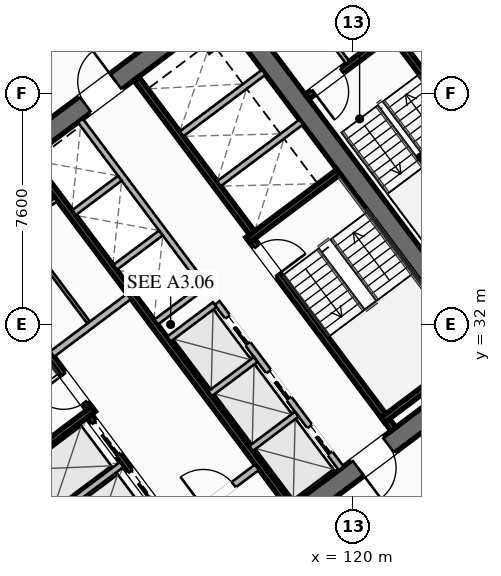
"""IFC4 building model, lengths in metres.
Left out: names, types, materials, properties, quantities, classifications, styles, units other than length and angle.
Written with IfcOpenShell. Run it as: python <this file> out.ifc"""

import sys

from ifc_helpers import new_model, si_unit, direction, frame, frame_2d, origin, place, context, subcontext, project, spatial, rectangle, extrude, element, fill, save


model = new_model("IFC4")
c1 = context("Model", 3, precision=1e-05, world=origin(), true_north=direction((0.0, 1.0)))
c2 = subcontext(c1, "Body", "Model", "MODEL_VIEW")
j1 = project(units=[si_unit("LENGTHUNIT", "METRE"), si_unit("PLANEANGLEUNIT", "RADIAN")], contexts=[c1])
p1 = place(None, origin())
s1 = spatial("IfcSite", under=j1, at=p1, CompositionType="ELEMENT")
p2 = place(p1, origin())
s2 = spatial("IfcBuilding", under=s1, at=p2, CompositionType="ELEMENT")
p3 = place(p2, frame((0.0, 0.0, 95.6)))
s3 = spatial("IfcBuildingStorey", under=s2, at=p3, CompositionType="ELEMENT", Elevation=95.6)
for number, where, z_axis, x_axis in (
    (1, (112.476, 21.107, 0.0), (0.0, 0.0, 1.0), (-0.6, 0.8, 0.0)),
    (2, (115.524, 42.893, 0.0), (0.0, 0.0, 1.0), (0.6, -0.8, 0.0)),
):
    element("IfcWall", number, at=place(p3, frame(where, z_axis=z_axis, x_axis=x_axis)), inside=s3, PredefinedType="SHEAR", context=c2, shape_type="SweptSolid", body=[
        extrude(rectangle(XDim=15.6, YDim=0.65, at=frame_2d((7.8, 0.0))), origin(), (0.0, 0.0, 1.0), 3.55),
    ])
p4 = place(p3, frame((124.429, 30.478, 0.0), z_axis=(0.0, 0.0, 1.0), x_axis=(-0.799998028465, -0.600002628705, 0.0)))
e3 = element("IfcWall", 3, at=p4, inside=s3, PredefinedType="SHEAR", context=c2, shape_type="SweptSolid", body=[
    extrude(rectangle(XDim=14.86, YDim=0.65, at=frame_2d((7.43, 0.0))), origin(), (0.0, 0.0, 1.0), 3.55),
])
p5 = place(p4, frame((9.13, 0.0, 0.0)))
e4 = element("IfcOpeningElement", 4, at=p5, cuts=e3, PredefinedType="OPENING", context=c2, shape_type="SweptSolid", body=[
    extrude(rectangle(XDim=1.25, YDim=2.25, at=frame_2d((0.625, 1.125))), frame((0.0, 0.335, 0.0), z_axis=(0.0, -1.0, 0.0), x_axis=(1.0, 0.0, 0.0)), (0.0, 0.0, 1.0), 0.67),
])
p6 = place(p4, frame((4.08, 0.0, 0.0)))
e5 = element("IfcOpeningElement", 5, at=p6, cuts=e3, PredefinedType="OPENING", context=c2, shape_type="SweptSolid", body=[
    extrude(rectangle(XDim=1.25, YDim=2.25, at=frame_2d((0.625, 1.125))), frame((0.0, 0.335, 0.0), z_axis=(0.0, -1.0, 0.0), x_axis=(1.0, 0.0, 0.0)), (0.0, 0.0, 1.0), 0.67),
])
p7 = place(p3, frame((103.571, 33.522, 0.0), z_axis=(0.0, 0.0, 1.0), x_axis=(0.799998028465, 0.600002628705, 0.0)))
e6 = element("IfcWall", 6, at=p7, inside=s3, PredefinedType="SHEAR", context=c2, shape_type="SweptSolid", body=[
    extrude(rectangle(XDim=14.86, YDim=0.65, at=frame_2d((7.43, 0.0))), origin(), (0.0, 0.0, 1.0), 3.55),
])
p8 = place(p7, frame((4.48, 0.0, 0.0)))
e7 = element("IfcOpeningElement", 7, at=p8, cuts=e6, PredefinedType="OPENING", context=c2, shape_type="SweptSolid", body=[
    extrude(rectangle(XDim=1.25, YDim=2.25, at=frame_2d((0.625, 1.125))), frame((0.0, 0.335, 0.0), z_axis=(0.0, -1.0, 0.0), x_axis=(1.0, 0.0, 0.0)), (0.0, 0.0, 1.0), 0.67),
])
p9 = place(p7, frame((9.53, 0.0, 0.0)))
e8 = element("IfcOpeningElement", 8, at=p9, cuts=e6, PredefinedType="OPENING", context=c2, shape_type="SweptSolid", body=[
    extrude(rectangle(XDim=1.25, YDim=2.25, at=frame_2d((0.625, 1.125))), frame((0.0, 0.335, 0.0), z_axis=(0.0, -1.0, 0.0), x_axis=(1.0, 0.0, 0.0)), (0.0, 0.0, 1.0), 0.67),
])
p10 = place(p3, frame((111.44, 29.08, 0.0), z_axis=(0.0, 0.0, 1.0), x_axis=(-0.600009827119, 0.799992629566, 0.0)))
e9 = element("IfcWall", 9, at=p10, inside=s3, PredefinedType="SHEAR", context=c2, shape_type="SweptSolid", body=[
    extrude(rectangle(XDim=7.95, YDim=0.2, at=frame_2d((3.975, 0.0))), origin(), (0.0, 0.0, 1.0), 3.35),
])
p11 = place(p10, frame((0.45, 0.0, 0.0)))
e10 = element("IfcOpeningElement", 10, at=p11, cuts=e9, PredefinedType="OPENING", context=c2, shape_type="SweptSolid", body=[
    extrude(rectangle(XDim=1.15, YDim=2.2, at=frame_2d((0.575, 1.1))), frame((0.0, 0.11, 0.0), z_axis=(0.0, -1.0, 0.0), x_axis=(1.0, 0.0, 0.0)), (0.0, 0.0, 1.0), 0.22),
])
p12 = place(p3, frame((108.476, 26.982, 0.0), z_axis=(0.0, 0.0, 1.0), x_axis=(0.799984290658, 0.600020945218, 0.0)))
e11 = element("IfcWall", 11, at=p12, inside=s3, PredefinedType="SHEAR", context=c2, shape_type="SweptSolid", body=[
    extrude(rectangle(XDim=3.73, YDim=0.2, at=frame_2d((1.865, 0.0))), origin(), (0.0, 0.0, 1.0), 3.35),
])
p13 = place(p3, frame((116.56, 34.92, 0.0), z_axis=(0.0, 0.0, 1.0), x_axis=(0.600009827119, -0.799992629566, 0.0)))
e12 = element("IfcWall", 12, at=p13, inside=s3, PredefinedType="SHEAR", context=c2, shape_type="SweptSolid", body=[
    extrude(rectangle(XDim=7.95, YDim=0.2, at=frame_2d((3.975, 0.0))), origin(), (0.0, 0.0, 1.0), 3.35),
])
p14 = place(p13, frame((0.45, 0.0, 0.0)))
e13 = element("IfcOpeningElement", 13, at=p14, cuts=e12, PredefinedType="OPENING", context=c2, shape_type="SweptSolid", body=[
    extrude(rectangle(XDim=1.15, YDim=2.2, at=frame_2d((0.575, 1.1))), frame((0.0, 0.11, 0.0), z_axis=(0.0, -1.0, 0.0), x_axis=(1.0, 0.0, 0.0)), (0.0, 0.0, 1.0), 0.22),
])
for number, where, z_axis, x_axis in (
    (14, (116.54, 34.78, 0.0), (0.0, 0.0, 1.0), (0.8, 0.6, 0.0)),
    (15, (120.98, 28.86, 0.0), (0.0, 0.0, 1.0), (0.8, 0.6, 0.0)),
):
    element("IfcWall", number, at=place(p3, frame(where, z_axis=z_axis, x_axis=x_axis)), inside=s3, PredefinedType="SHEAR", context=c2, shape_type="SweptSolid", body=[
        extrude(rectangle(XDim=3.73, YDim=0.2, at=frame_2d((1.865, 0.0))), origin(), (0.0, 0.0, 1.0), 3.35),
    ])
p15 = place(p3, frame((117.938, 26.016, 0.0), z_axis=(0.0, 0.0, 1.0), x_axis=(-0.600005463273, 0.799995902516, 0.0)))
e16 = element("IfcWall", 16, at=p15, inside=s3, PredefinedType="SHEAR", context=c2, shape_type="SweptSolid", body=[
    extrude(rectangle(XDim=14.3, YDim=0.2, at=frame_2d((7.15, 0.0))), origin(), (0.0, 0.0, 1.0), 3.35),
])
p16 = place(p3, frame((110.104, 31.028, 0.0), z_axis=(0.0, 0.0, 1.0), x_axis=(0.800018601094, 0.59997519774, 0.0)))
e17 = element("IfcWall", 17, at=p16, inside=s3, PredefinedType="SOLIDWALL", context=c2, shape_type="SweptSolid", body=[
    extrude(rectangle(XDim=3.15, YDim=0.22, at=frame_2d((1.575, 0.0))), origin(), (0.0, 0.0, 1.0), 2.703),
])
p17 = place(p3, frame((114.316, 25.412, 0.0), z_axis=(0.0, 0.0, 1.0), x_axis=(0.800018601094, 0.59997519774, 0.0)))
e18 = element("IfcWall", 18, at=p17, inside=s3, PredefinedType="SOLIDWALL", context=c2, shape_type="SweptSolid", body=[
    extrude(rectangle(XDim=3.15, YDim=0.22, at=frame_2d((1.575, 0.0))), origin(), (0.0, 0.0, 1.0), 2.703),
])
p18 = place(p17, frame((0.95, 0.0, 0.0)))
e19 = element("IfcOpeningElement", 19, at=p18, cuts=e18, PredefinedType="OPENING", context=c2, shape_type="SweptSolid", body=[
    extrude(rectangle(XDim=1.25, YDim=2.25, at=frame_2d((0.625, 1.125))), frame((0.0, 0.12, 0.0), z_axis=(0.0, -1.0, 0.0), x_axis=(1.0, 0.0, 0.0)), (0.0, 0.0, 1.0), 0.24),
])
p19 = place(p3, frame((115.13, 23.91, 0.0), z_axis=(0.0, 0.0, 1.0), x_axis=(-0.599975393228, 0.800018454488, 0.0)))
e20 = element("IfcWall", 20, at=p19, inside=s3, PredefinedType="SHEAR", context=c2, shape_type="SweptSolid", body=[
    extrude(rectangle(XDim=6.35, YDim=0.2, at=frame_2d((3.175, 0.0))), origin(), (0.0, 0.0, 1.0), 3.35),
])
p20 = place(p19, frame((4.775, 0.0, 0.0)))
e21 = element("IfcOpeningElement", 21, at=p20, cuts=e20, PredefinedType="OPENING", context=c2, shape_type="SweptSolid", body=[
    extrude(rectangle(XDim=1.3, YDim=2.25, at=frame_2d((0.65, 1.125))), frame((0.0, 0.11, 0.0), z_axis=(0.0, -1.0, 0.0), x_axis=(1.0, 0.0, 0.0)), (0.0, 0.0, 1.0), 0.22),
])
p21 = place(p19, frame((2.775, 0.0, 0.0)))
e22 = element("IfcOpeningElement", 22, at=p21, cuts=e20, PredefinedType="OPENING", context=c2, shape_type="SweptSolid", body=[
    extrude(rectangle(XDim=1.3, YDim=2.25, at=frame_2d((0.65, 1.125))), frame((0.0, 0.11, 0.0), z_axis=(0.0, -1.0, 0.0), x_axis=(1.0, 0.0, 0.0)), (0.0, 0.0, 1.0), 0.22),
])
p22 = place(p19, frame((0.575, 0.0, 0.0)))
e23 = element("IfcOpeningElement", 23, at=p22, cuts=e20, PredefinedType="OPENING", context=c2, shape_type="SweptSolid", body=[
    extrude(rectangle(XDim=1.3, YDim=2.25, at=frame_2d((0.65, 1.125))), frame((0.0, 0.11, 0.0), z_axis=(0.0, -1.0, 0.0), x_axis=(1.0, 0.0, 0.0)), (0.0, 0.0, 1.0), 0.22),
])
p23 = place(p3, frame((109.688, 25.366, 0.0), z_axis=(0.0, 0.0, 1.0), x_axis=(0.8, 0.6, 0.0)))
e24 = element("IfcWall", 24, at=p23, inside=s3, PredefinedType="SOLIDWALL", context=c2, shape_type="SweptSolid", body=[
    extrude(rectangle(XDim=3.38, YDim=0.2, at=frame_2d((1.69, 0.0))), origin(), (0.0, 0.0, 1.0), 3.35),
])
p24 = place(p3, frame((112.87, 40.09, 0.0), z_axis=(0.0, 0.0, 1.0), x_axis=(0.599975393228, -0.800018454488, 0.0)))
e25 = element("IfcWall", 25, at=p24, inside=s3, PredefinedType="SHEAR", context=c2, shape_type="SweptSolid", body=[
    extrude(rectangle(XDim=6.35, YDim=0.2, at=frame_2d((3.175, 0.0))), origin(), (0.0, 0.0, 1.0), 3.35),
])
for number, where, z_axis, x_axis in (
    (26, (115.59, 36.63, 0.0), (0.0, 0.0, 1.0), (0.8, 0.6, 0.0)),
    (27, (114.36, 38.27, 0.0), (0.0, 0.0, 1.0), (0.8, 0.6, 0.0)),
):
    element("IfcWall", number, at=place(p3, frame(where, z_axis=z_axis, x_axis=x_axis)), inside=s3, PredefinedType="SOLIDWALL", context=c2, shape_type="SweptSolid", body=[
        extrude(rectangle(XDim=3.38, YDim=0.2, at=frame_2d((1.69, 0.0))), origin(), (0.0, 0.0, 1.0), 3.35),
    ])
p25 = place(p3, frame((107.71, 34.22, 0.0), z_axis=(0.0, 0.0, 1.0), x_axis=(0.799981399002, 0.60002480053, 0.0)))
e28 = element("IfcWall", 28, at=p25, inside=s3, PredefinedType="PARTITIONING", context=c2, shape_type="SweptSolid", body=[
    extrude(rectangle(XDim=3.15, YDim=0.135, at=frame_2d((1.575, 0.0))), origin(), (0.0, 0.0, 1.0), 2.703),
])
p26 = place(p25, frame((0.25, 0.0, 0.0)))
e29 = element("IfcOpeningElement", 29, at=p26, cuts=e28, PredefinedType="OPENING", context=c2, shape_type="SweptSolid", body=[
    extrude(rectangle(XDim=0.95, YDim=2.05, at=frame_2d((0.475, 1.025))), frame((0.0, 0.077, 0.0), z_axis=(0.0, -1.0, 0.0), x_axis=(1.0, 0.0, 0.0)), (0.0, 0.0, 1.0), 0.155),
])
p27 = place(p25, frame((1.95, 0.0, 0.0)))
e30 = element("IfcOpeningElement", 30, at=p27, cuts=e28, PredefinedType="OPENING", context=c2, shape_type="SweptSolid", body=[
    extrude(rectangle(XDim=0.95, YDim=2.05, at=frame_2d((0.475, 1.025))), frame((0.0, 0.077, 0.0), z_axis=(0.0, -1.0, 0.0), x_axis=(1.0, 0.0, 0.0)), (0.0, 0.0, 1.0), 0.155),
])
p28 = place(p3, frame((111.296, 32.072, 0.0), z_axis=(0.0, 0.0, 1.0), x_axis=(-0.59995887973, 0.800030838552, 0.0)))
e31 = element("IfcWall", 31, at=p28, inside=s3, PredefinedType="PARTITIONING", context=c2, shape_type="SweptSolid", body=[
    extrude(rectangle(XDim=3.8, YDim=0.11, at=frame_2d((1.9, 0.0))), origin(), (0.0, 0.0, 1.0), 2.703),
])
p29 = place(p3, frame((119.61, 27.27, 0.0), z_axis=(0.0, 0.0, 1.0), x_axis=(-0.600011488909, 0.79999138319, 0.0)))
e32 = element("IfcWall", 32, at=p29, inside=s3, PredefinedType="SOLIDWALL", context=c2, shape_type="SweptSolid", body=[
    extrude(rectangle(XDim=6.8, YDim=0.2, at=frame_2d((3.4, 0.0))), origin(), (0.0, 0.0, 1.0), 3.35),
])
p30 = place(p29, frame((0.625, 0.0, 0.0)))
e33 = element("IfcOpeningElement", 33, at=p30, cuts=e32, PredefinedType="OPENING", context=c2, shape_type="SweptSolid", body=[
    extrude(rectangle(XDim=1.1, YDim=2.2, at=frame_2d((0.55, 1.1))), frame((0.0, 0.11, 0.0), z_axis=(0.0, -1.0, 0.0), x_axis=(1.0, 0.0, 0.0)), (0.0, 0.0, 1.0), 0.22),
])
p31 = place(p29, frame((2.875, 0.0, 0.0)))
e34 = element("IfcOpeningElement", 34, at=p31, cuts=e32, PredefinedType="OPENING", context=c2, shape_type="SweptSolid", body=[
    extrude(rectangle(XDim=1.1, YDim=2.2, at=frame_2d((0.55, 1.1))), frame((0.0, 0.11, 0.0), z_axis=(0.0, -1.0, 0.0), x_axis=(1.0, 0.0, 0.0)), (0.0, 0.0, 1.0), 0.22),
])
p32 = place(p29, frame((5.125, 0.0, 0.0)))
e35 = element("IfcOpeningElement", 35, at=p32, cuts=e32, PredefinedType="OPENING", context=c2, shape_type="SweptSolid", body=[
    extrude(rectangle(XDim=1.1, YDim=2.2, at=frame_2d((0.55, 1.1))), frame((0.0, 0.11, 0.0), z_axis=(0.0, -1.0, 0.0), x_axis=(1.0, 0.0, 0.0)), (0.0, 0.0, 1.0), 0.22),
])
p33 = place(p3, frame((116.646, 27.922, 0.0), z_axis=(0.0, 0.0, 1.0), x_axis=(0.8, 0.6, 0.0)))
e36 = element("IfcWall", 36, at=p33, inside=s3, PredefinedType="SOLIDWALL", context=c2, shape_type="SweptSolid", body=[
    extrude(rectangle(XDim=1.88, YDim=0.2, at=frame_2d((0.94, 0.0))), origin(), (0.0, 0.0, 1.0), 3.35),
])
p34 = place(p3, frame((115.296, 29.722, 0.0), z_axis=(0.0, 0.0, 1.0), x_axis=(0.799984418148, 0.600020775241, 0.0)))
e37 = element("IfcWall", 37, at=p34, inside=s3, PredefinedType="SOLIDWALL", context=c2, shape_type="SweptSolid", body=[
    extrude(rectangle(XDim=1.88, YDim=0.2, at=frame_2d((0.94, 0.0))), origin(), (0.0, 0.0, 1.0), 3.35),
])
p35 = place(p3, frame((113.946, 31.522, 0.0), z_axis=(0.0, 0.0, 1.0), x_axis=(0.8, 0.6, 0.0)))
e38 = element("IfcWall", 38, at=p35, inside=s3, PredefinedType="SOLIDWALL", context=c2, shape_type="SweptSolid", body=[
    extrude(rectangle(XDim=1.88, YDim=0.2, at=frame_2d((0.94, 0.0))), origin(), (0.0, 0.0, 1.0), 3.35),
])
p36 = place(p3, frame((115.11, 33.27, 0.0), z_axis=(0.0, 0.0, 1.0), x_axis=(-0.600011488909, 0.79999138319, 0.0)))
e39 = element("IfcWall", 39, at=p36, inside=s3, PredefinedType="SOLIDWALL", context=c2, shape_type="SweptSolid", body=[
    extrude(rectangle(XDim=6.8, YDim=0.2, at=frame_2d((3.4, 0.0))), origin(), (0.0, 0.0, 1.0), 3.35),
])
p37 = place(p3, frame((113.526, 32.082, 0.0), z_axis=(0.0, 0.0, 1.0), x_axis=(0.800046745961, 0.599937666993, 0.0)))
e40 = element("IfcWall", 40, at=p37, inside=s3, PredefinedType="SOLIDWALL", context=c2, shape_type="SweptSolid", body=[
    extrude(rectangle(XDim=1.88, YDim=0.2, at=frame_2d((0.94, 0.0))), origin(), (0.0, 0.0, 1.0), 3.35),
])
p38 = place(p3, frame((112.176, 33.882, 0.0), z_axis=(0.0, 0.0, 1.0), x_axis=(0.8, 0.6, 0.0)))
e41 = element("IfcWall", 41, at=p38, inside=s3, PredefinedType="SOLIDWALL", context=c2, shape_type="SweptSolid", body=[
    extrude(rectangle(XDim=1.88, YDim=0.2, at=frame_2d((0.94, 0.0))), origin(), (0.0, 0.0, 1.0), 3.35),
])
p39 = place(p3, frame((110.826, 35.682, 0.0), z_axis=(0.0, 0.0, 1.0), x_axis=(0.799984418148, 0.600020775241, 0.0)))
e42 = element("IfcWall", 42, at=p39, inside=s3, PredefinedType="SOLIDWALL", context=c2, shape_type="SweptSolid", body=[
    extrude(rectangle(XDim=1.88, YDim=0.2, at=frame_2d((0.94, 0.0))), origin(), (0.0, 0.0, 1.0), 3.35),
])
p40 = place(p3, frame((125.304, 36.228, 0.0), z_axis=(0.0, 0.0, 1.0), x_axis=(-0.59998851072, 0.800008616831, 0.0)))
e43 = element("IfcWall", 43, at=p40, inside=s3, PredefinedType="SHEAR", context=c2, shape_type="SweptSolid", body=[
    extrude(rectangle(XDim=6.8, YDim=0.2, at=frame_2d((3.4, 0.0))), origin(), (0.0, 0.0, 1.0), 3.35),
])
p41 = place(p3, frame((121.204, 41.528, 0.0), z_axis=(0.0, 0.0, 1.0), x_axis=(-0.800017232136, -0.599977023131, 0.0)))
e44 = element("IfcWall", 44, at=p41, inside=s3, PredefinedType="SHEAR", context=c2, shape_type="SweptSolid", body=[
    extrude(rectangle(XDim=3.4, YDim=0.2, at=frame_2d((1.7, 0.0))), origin(), (0.0, 0.0, 1.0), 3.35),
])
p42 = place(p41, frame((1.975, 0.0, 0.0)))
e45 = element("IfcOpeningElement", 45, at=p42, cuts=e44, PredefinedType="OPENING", context=c2, shape_type="SweptSolid", body=[
    extrude(rectangle(XDim=1.15, YDim=2.2, at=frame_2d((0.575, 1.1))), frame((0.0, 0.11, 0.0), z_axis=(0.0, -1.0, 0.0), x_axis=(1.0, 0.0, 0.0)), (0.0, 0.0, 1.0), 0.22),
])
p43 = place(p3, frame((119.824, 40.618, 0.0), z_axis=(0.0, 0.0, 1.0), x_axis=(-0.599982243973, 0.800013316712, 0.0)))
e46 = element("IfcWall", 46, at=p43, inside=s3, PredefinedType="PARTITIONING", context=c2, shape_type="SweptSolid", body=[
    extrude(rectangle(XDim=4.4, YDim=0.135, at=frame_2d((2.2, 0.0))), origin(), (0.0, 0.0, 1.0), 2.703),
])
p44 = place(p3, frame((98.276, 34.332, 0.0), z_axis=(0.0, 0.0, 1.0), x_axis=(0.800003113347, 0.599995848849, 0.0)))
e47 = element("IfcWall", 47, at=p44, inside=s3, PredefinedType="PARTITIONING", context=c2, shape_type="SweptSolid", body=[
    extrude(rectangle(XDim=28.23, YDim=0.135, at=frame_2d((14.115, 0.0))), origin(), (0.0, 0.0, 1.0), 2.703),
])
p45 = place(p44, frame((0.3, 0.0, 0.0)))
e48 = element("IfcOpeningElement", 48, at=p45, cuts=e47, PredefinedType="OPENING", context=c2, shape_type="SweptSolid", body=[
    extrude(rectangle(XDim=0.95, YDim=2.05, at=frame_2d((0.475, 1.025))), frame((0.0, 0.077, 0.0), z_axis=(0.0, -1.0, 0.0), x_axis=(1.0, 0.0, 0.0)), (0.0, 0.0, 1.0), 0.155),
])
p46 = place(p44, frame((11.023, 0.0, 0.0)))
e49 = element("IfcOpeningElement", 49, at=p46, cuts=e47, PredefinedType="OPENING", context=c2, shape_type="SweptSolid", body=[
    extrude(rectangle(XDim=0.95, YDim=2.05, at=frame_2d((0.475, 1.025))), frame((0.0, 0.077, 0.0), z_axis=(0.0, -1.0, 0.0), x_axis=(1.0, 0.0, 0.0)), (0.0, 0.0, 1.0), 0.155),
])
p47 = place(p44, frame((26.98, 0.0, 0.0)))
e50 = element("IfcOpeningElement", 50, at=p47, cuts=e47, PredefinedType="OPENING", context=c2, shape_type="SweptSolid", body=[
    extrude(rectangle(XDim=0.95, YDim=2.05, at=frame_2d((0.475, 1.025))), frame((0.0, 0.077, 0.0), z_axis=(0.0, -1.0, 0.0), x_axis=(1.0, 0.0, 0.0)), (0.0, 0.0, 1.0), 0.155),
])
p48 = place(p3, frame((134.18, 33.51, 0.0), z_axis=(0.0, 0.0, 1.0), x_axis=(-0.8, -0.6, 0.0)))
e51 = element("IfcWall", 51, at=p48, inside=s3, PredefinedType="PARTITIONING", context=c2, shape_type="SweptSolid", body=[
    extrude(rectangle(XDim=28.23, YDim=0.135, at=frame_2d((14.115, 0.0))), origin(), (0.0, 0.0, 1.0), 2.703),
])
p49 = place(p48, frame((26.9, 0.0, 0.0)))
e52 = element("IfcOpeningElement", 52, at=p49, cuts=e51, PredefinedType="OPENING", context=c2, shape_type="SweptSolid", body=[
    extrude(rectangle(XDim=0.95, YDim=2.05, at=frame_2d((0.475, 1.025))), frame((0.0, 0.077, 0.0), z_axis=(0.0, -1.0, 0.0), x_axis=(1.0, 0.0, 0.0)), (0.0, 0.0, 1.0), 0.155),
])
p50 = place(p48, frame((20.314, 0.0, 0.0)))
e53 = element("IfcOpeningElement", 53, at=p50, cuts=e51, PredefinedType="OPENING", context=c2, shape_type="SweptSolid", body=[
    extrude(rectangle(XDim=0.95, YDim=2.05, at=frame_2d((0.475, 1.025))), frame((0.0, 0.077, 0.0), z_axis=(0.0, -1.0, 0.0), x_axis=(1.0, 0.0, 0.0)), (0.0, 0.0, 1.0), 0.155),
])
p51 = place(p48, frame((0.38, 0.0, 0.0)))
e54 = element("IfcOpeningElement", 54, at=p51, cuts=e51, PredefinedType="OPENING", context=c2, shape_type="SweptSolid", body=[
    extrude(rectangle(XDim=0.95, YDim=2.05, at=frame_2d((0.475, 1.025))), frame((0.0, 0.077, 0.0), z_axis=(0.0, -1.0, 0.0), x_axis=(1.0, 0.0, 0.0)), (0.0, 0.0, 1.0), 0.155),
])
p52 = place(p3, frame((111.548, 16.636, 0.0), z_axis=(0.0, 0.0, 1.0), x_axis=(-0.600001772333, 0.799998670747, 0.0)))
e55 = element("IfcWall", 55, at=p52, inside=s3, PredefinedType="PARTITIONING", context=c2, shape_type="SweptSolid", body=[
    extrude(rectangle(XDim=22.04, YDim=0.135, at=frame_2d((11.02, 0.0))), origin(), (0.0, 0.0, 1.0), 2.703),
])
p53 = place(p52, frame((20.79, 0.0, 0.0)))
e56 = element("IfcOpeningElement", 56, at=p53, cuts=e55, PredefinedType="OPENING", context=c2, shape_type="SweptSolid", body=[
    extrude(rectangle(XDim=0.95, YDim=2.05, at=frame_2d((0.475, 1.025))), frame((0.0, 0.077, 0.0), z_axis=(0.0, -1.0, 0.0), x_axis=(1.0, 0.0, 0.0)), (0.0, 0.0, 1.0), 0.155),
])
p54 = place(p9, origin())
e57 = element("IfcDoor", 57, at=p54, inside=s3, OperationType="SINGLE_SWING_RIGHT", PredefinedType="DOOR", context=c2, shape_type="SweptSolid", body=[
    extrude(rectangle(XDim=1.25, YDim=2.25, at=frame_2d((0.625, 1.125))), frame((0.0, 0.025, 0.0), z_axis=(0.0, -1.0, 0.0), x_axis=(1.0, 0.0, 0.0)), (0.0, 0.0, 1.0), 0.05),
])
fill(e8, e57)
p55 = place(p6, origin())
e58 = element("IfcDoor", 58, at=p55, inside=s3, OperationType="SINGLE_SWING_RIGHT", PredefinedType="DOOR", context=c2, shape_type="SweptSolid", body=[
    extrude(rectangle(XDim=1.25, YDim=2.25, at=frame_2d((0.625, 1.125))), frame((0.0, 0.025, 0.0), z_axis=(0.0, -1.0, 0.0), x_axis=(1.0, 0.0, 0.0)), (0.0, 0.0, 1.0), 0.05),
])
fill(e5, e58)
p56 = place(p11, origin())
e59 = element("IfcDoor", 59, at=p56, inside=s3, OperationType="SINGLE_SWING_RIGHT", PredefinedType="DOOR", context=c2, shape_type="SweptSolid", body=[
    extrude(rectangle(XDim=1.15, YDim=2.2, at=frame_2d((0.575, 1.1))), frame((0.0, 0.025, 0.0), z_axis=(0.0, -1.0, 0.0), x_axis=(1.0, 0.0, 0.0)), (0.0, 0.0, 1.0), 0.05),
])
fill(e10, e59)
p57 = place(p14, origin())
e60 = element("IfcDoor", 60, at=p57, inside=s3, OperationType="SINGLE_SWING_RIGHT", PredefinedType="DOOR", context=c2, shape_type="SweptSolid", body=[
    extrude(rectangle(XDim=1.15, YDim=2.2, at=frame_2d((0.575, 1.1))), frame((0.0, 0.025, 0.0), z_axis=(0.0, -1.0, 0.0), x_axis=(1.0, 0.0, 0.0)), (0.0, 0.0, 1.0), 0.05),
])
fill(e13, e60)
p58 = place(p18, origin())
e61 = element("IfcDoor", 61, at=p58, inside=s3, OperationType="SINGLE_SWING_LEFT", PredefinedType="DOOR", context=c2, shape_type="SweptSolid", body=[
    extrude(rectangle(XDim=1.25, YDim=2.25, at=frame_2d((0.625, 1.125))), frame((0.0, 0.025, 0.0), z_axis=(0.0, -1.0, 0.0), x_axis=(1.0, 0.0, 0.0)), (0.0, 0.0, 1.0), 0.05),
])
fill(e19, e61)
p59 = place(p42, origin())
e62 = element("IfcDoor", 62, at=p59, inside=s3, OperationType="SINGLE_SWING_RIGHT", PredefinedType="DOOR", context=c2, shape_type="SweptSolid", body=[
    extrude(rectangle(XDim=1.15, YDim=2.2, at=frame_2d((0.575, 1.1))), frame((0.0, 0.025, 0.0), z_axis=(0.0, -1.0, 0.0), x_axis=(1.0, 0.0, 0.0)), (0.0, 0.0, 1.0), 0.05),
])
fill(e45, e62)
p60 = place(p20, origin())
e63 = element("IfcDoor", 63, at=p60, inside=s3, OperationType="SLIDING_TO_LEFT", PredefinedType="DOOR", context=c2, shape_type="SweptSolid", body=[
    extrude(rectangle(XDim=1.3, YDim=2.25, at=frame_2d((0.65, 1.125))), frame((0.0, 0.025, 0.0), z_axis=(0.0, -1.0, 0.0), x_axis=(1.0, 0.0, 0.0)), (0.0, 0.0, 1.0), 0.05),
])
fill(e21, e63)
p61 = place(p21, origin())
e64 = element("IfcDoor", 64, at=p61, inside=s3, OperationType="SLIDING_TO_LEFT", PredefinedType="DOOR", context=c2, shape_type="SweptSolid", body=[
    extrude(rectangle(XDim=1.3, YDim=2.25, at=frame_2d((0.65, 1.125))), frame((0.0, 0.025, 0.0), z_axis=(0.0, -1.0, 0.0), x_axis=(1.0, 0.0, 0.0)), (0.0, 0.0, 1.0), 0.05),
])
fill(e22, e64)
p62 = place(p30, origin())
e65 = element("IfcDoor", 65, at=p62, inside=s3, OperationType="SLIDING_TO_LEFT", PredefinedType="DOOR", context=c2, shape_type="SweptSolid", body=[
    extrude(rectangle(XDim=1.1, YDim=2.2, at=frame_2d((0.55, 1.1))), frame((0.0, 0.025, 0.0), z_axis=(0.0, -1.0, 0.0), x_axis=(1.0, 0.0, 0.0)), (0.0, 0.0, 1.0), 0.05),
])
fill(e33, e65)
p63 = place(p31, origin())
e66 = element("IfcDoor", 66, at=p63, inside=s3, OperationType="SLIDING_TO_LEFT", PredefinedType="DOOR", context=c2, shape_type="SweptSolid", body=[
    extrude(rectangle(XDim=1.1, YDim=2.2, at=frame_2d((0.55, 1.1))), frame((0.0, 0.025, 0.0), z_axis=(0.0, -1.0, 0.0), x_axis=(1.0, 0.0, 0.0)), (0.0, 0.0, 1.0), 0.05),
])
fill(e34, e66)
p64 = place(p32, origin())
e67 = element("IfcDoor", 67, at=p64, inside=s3, OperationType="SLIDING_TO_LEFT", PredefinedType="DOOR", context=c2, shape_type="SweptSolid", body=[
    extrude(rectangle(XDim=1.1, YDim=2.2, at=frame_2d((0.55, 1.1))), frame((0.0, 0.025, 0.0), z_axis=(0.0, -1.0, 0.0), x_axis=(1.0, 0.0, 0.0)), (0.0, 0.0, 1.0), 0.05),
])
fill(e35, e67)
save(model, sys.argv[1])
